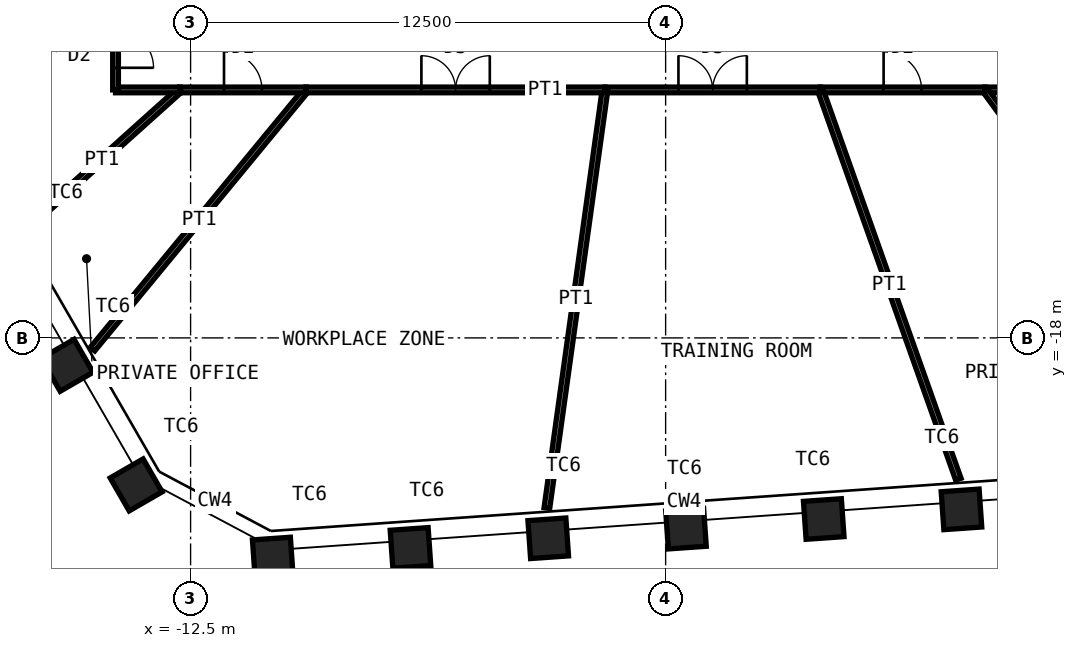
"""IFC4 building model, lengths in metres.
Left out: names, types, materials, properties, quantities, classifications, styles, units other than length and angle.
Written with IfcOpenShell. Run it as: python <this file> out.ifc"""

import sys

from ifc_helpers import new_model, si_unit, direction, frame, frame_2d, origin, origin_2d, place, context, subcontext, project, spatial, rectangle, hollow_rectangle, extrude, element, fill, save


model = new_model("IFC4")
c1 = context("Model", 3, precision=1e-05, world=origin(), true_north=direction((0.0, 1.0)))
c2 = subcontext(c1, "Body", "Model", "MODEL_VIEW")
j1 = project(units=[si_unit("LENGTHUNIT", "METRE"), si_unit("PLANEANGLEUNIT", "RADIAN")], contexts=[c1])
p1 = place(None, origin())
s1 = spatial("IfcSite", under=j1, at=p1, CompositionType="ELEMENT")
p2 = place(p1, origin())
s2 = spatial("IfcBuilding", under=s1, at=p2, CompositionType="ELEMENT")
p3 = place(p2, frame((0.0, 0.0, 243.4)))
s3 = spatial("IfcBuildingStorey", under=s2, at=p3, CompositionType="ELEMENT", Elevation=243.4)
for number, where, z_axis, x_axis in (
    (1, (7.785, -22.512, 0.0), (0.0, 0.0, 1.0), (0.998, 0.07, 0.0)),
    (2, (4.16, -22.765, 0.0), (0.0, 0.0, 1.0), (0.998, 0.07, 0.0)),
    (3, (0.536, -23.019, 0.0), (0.0, 0.0, 1.0), (0.998, 0.07, 0.0)),
    (4, (-3.089, -23.272, 0.0), (0.0, 0.0, 1.0), (0.998, 0.07, 0.0)),
    (5, (-6.714, -23.526, 0.0), (0.0, 0.0, 1.0), (0.998, 0.07, 0.0)),
    (6, (-10.338, -23.779, 0.0), (0.0, 0.0, 1.0), (0.998, 0.07, 0.0)),
    (7, (-13.933, -21.868, 0.0), (0.0, 0.0, 1.0), (0.5, -0.866, 0.0)),
    (8, (-15.749, -18.721, 0.0), (0.0, 0.0, 1.0), (0.5, -0.866, 0.0)),
):
    element("IfcColumn", number, at=place(p3, frame(where, z_axis=z_axis, x_axis=x_axis)), inside=s3, PredefinedType="COLUMN", context=c2, shape_type="SweptSolid", body=[
        extrude(hollow_rectangle(XDim=1.0, YDim=1.0, WallThickness=0.06, at=origin_2d()), origin(), (0.0, 0.0, 1.0), 4.2),
    ])
p4 = place(p3, frame((-15.08, -18.294, 0.0), z_axis=(0.0, 0.0, 1.0), x_axis=(0.636052894953, 0.771645459277, 0.0)))
e9 = element("IfcWall", 9, at=p4, inside=s3, PredefinedType="PARTITIONING", context=c2, shape_type="SweptSolid", body=[
    extrude(rectangle(XDim=8.837, YDim=0.15, at=frame_2d((4.418, 0.0))), origin(), (0.0, 0.0, 1.0), 3.43),
])
p5 = place(p3, frame((-9.459, -11.475, 0.0), z_axis=(0.0, 0.0, 1.0), x_axis=(-1.0, 0.0, 0.0)))
e10 = element("IfcWall", 10, at=p5, inside=s3, PredefinedType="PARTITIONING", context=c2, shape_type="SweptSolid", body=[
    extrude(rectangle(XDim=3.324, YDim=0.15, at=frame_2d((1.662, 0.0))), origin(), (0.0, 0.0, 1.0), 4.03),
])
p6 = place(p5, frame((1.162, 0.0, 0.0)))
e11 = element("IfcOpeningElement", 11, at=p6, cuts=e10, PredefinedType="OPENING", context=c2, shape_type="SweptSolid", body=[
    extrude(rectangle(XDim=1.0, YDim=2.4, at=frame_2d((0.5, 1.2))), frame((0.0, 0.085, 0.0), z_axis=(0.0, -1.0, 0.0), x_axis=(1.0, 0.0, 0.0)), (0.0, 0.0, 1.0), 0.17),
])
p7 = place(p3, frame((-16.885, -15.158, 0.0), z_axis=(0.0, 0.0, 1.0), x_axis=(0.744165513773, 0.667995275515, 0.0)))
e12 = element("IfcWall", 12, at=p7, inside=s3, PredefinedType="PARTITIONING", context=c2, shape_type="SweptSolid", body=[
    extrude(rectangle(XDim=5.513, YDim=0.15, at=frame_2d((2.756, 0.0))), origin(), (0.0, 0.0, 1.0), 3.43),
])
p8 = place(p3, frame((-12.783, -11.475, 0.0), z_axis=(0.0, 0.0, 1.0), x_axis=(-1.0, 0.0, 0.0)))
e13 = element("IfcWall", 13, at=p8, inside=s3, PredefinedType="PARTITIONING", context=c2, shape_type="SweptSolid", body=[
    extrude(rectangle(XDim=1.692, YDim=0.15, at=frame_2d((0.846, 0.0))), origin(), (0.0, 0.0, 1.0), 4.03),
])
p9 = place(p3, frame((-14.475, -11.475, 0.0), z_axis=(0.0, 0.0, 1.0), x_axis=(0.0, 1.0, 0.0)))
e14 = element("IfcWall", 14, at=p9, inside=s3, PredefinedType="PARTITIONING", context=c2, shape_type="SweptSolid", body=[
    extrude(rectangle(XDim=2.164, YDim=0.15, at=frame_2d((1.082, 0.0))), origin(), (0.0, 0.0, 1.0), 4.03),
])
p10 = place(p9, frame((0.582, 0.0, 0.0)))
e15 = element("IfcOpeningElement", 15, at=p10, cuts=e14, PredefinedType="OPENING", context=c2, shape_type="SweptSolid", body=[
    extrude(rectangle(XDim=1.0, YDim=2.4, at=frame_2d((0.5, 1.2))), frame((0.0, 0.085, 0.0), z_axis=(0.0, -1.0, 0.0), x_axis=(1.0, 0.0, 0.0)), (0.0, 0.0, 1.0), 0.17),
])
p11 = place(p3, frame((-18.693, -12.024, 0.0), z_axis=(0.0, 0.0, 1.0), x_axis=(0.841031335058, 0.540986407824, 0.0)))
e16 = element("IfcWall", 16, at=p11, inside=s3, PredefinedType="PARTITIONING", context=c2, shape_type="SweptSolid", body=[
    extrude(rectangle(XDim=5.015, YDim=0.15, at=frame_2d((2.507, 0.0))), origin(), (0.0, 0.0, 1.0), 3.43),
])
p12 = place(p3, frame((11.266, -11.475, 0.0), z_axis=(0.0, 0.0, 1.0), x_axis=(-1.0, 0.0, 0.0)))
e17 = element("IfcWall", 17, at=p12, inside=s3, PredefinedType="PARTITIONING", context=c2, shape_type="SweptSolid", body=[
    extrude(rectangle(XDim=2.863, YDim=0.15, at=frame_2d((1.432, 0.0))), origin(), (0.0, 0.0, 1.0), 4.03),
])
p13 = place(p12, frame((0.932, 0.0, 0.0)))
e18 = element("IfcOpeningElement", 18, at=p13, cuts=e17, PredefinedType="OPENING", context=c2, shape_type="SweptSolid", body=[
    extrude(rectangle(XDim=1.0, YDim=2.4, at=frame_2d((0.5, 1.2))), frame((0.0, 0.085, 0.0), z_axis=(0.0, -1.0, 0.0), x_axis=(1.0, 0.0, 0.0)), (0.0, 0.0, 1.0), 0.17),
])
p14 = place(p3, frame((14.339, -19.582, 0.0), z_axis=(0.0, 0.0, 1.0), x_axis=(-0.590789413226, 0.806825798559, 0.0)))
e19 = element("IfcWall", 19, at=p14, inside=s3, PredefinedType="PARTITIONING", context=c2, shape_type="SweptSolid", body=[
    extrude(rectangle(XDim=10.048, YDim=0.15, at=frame_2d((5.024, 0.0))), origin(), (0.0, 0.0, 1.0), 2.93),
])
p15 = place(p3, frame((8.403, -11.475, 0.0), z_axis=(0.0, 0.0, 1.0), x_axis=(-1.0, 0.0, 0.0)))
e20 = element("IfcWall", 20, at=p15, inside=s3, PredefinedType="PARTITIONING", context=c2, shape_type="SweptSolid", body=[
    extrude(rectangle(XDim=4.333, YDim=0.15, at=frame_2d((2.167, 0.0))), origin(), (0.0, 0.0, 1.0), 4.03),
])
p16 = place(p15, frame((1.667, 0.0, 0.0)))
e21 = element("IfcOpeningElement", 21, at=p16, cuts=e20, PredefinedType="OPENING", context=c2, shape_type="SweptSolid", body=[
    extrude(rectangle(XDim=1.0, YDim=2.4, at=frame_2d((0.5, 1.2))), frame((0.0, 0.085, 0.0), z_axis=(0.0, -1.0, 0.0), x_axis=(1.0, 0.0, 0.0)), (0.0, 0.0, 1.0), 0.17),
])
p17 = place(p3, frame((7.703, -21.719, 0.0), z_axis=(0.0, 0.0, 1.0), x_axis=(-0.334269551553, 0.942477515331, 0.0)))
e22 = element("IfcWall", 22, at=p17, inside=s3, PredefinedType="PARTITIONING", context=c2, shape_type="SweptSolid", body=[
    extrude(rectangle(XDim=10.869, YDim=0.15, at=frame_2d((5.435, 0.0))), origin(), (0.0, 0.0, 1.0), 3.43),
])
p18 = place(p3, frame((4.07, -11.475, 0.0), z_axis=(0.0, 0.0, 1.0), x_axis=(-1.0, 0.0, 0.0)))
e23 = element("IfcWall", 23, at=p18, inside=s3, PredefinedType="PARTITIONING", context=c2, shape_type="SweptSolid", body=[
    extrude(rectangle(XDim=5.665, YDim=0.15, at=frame_2d((2.832, 0.0))), origin(), (0.0, 0.0, 1.0), 4.03),
])
p19 = place(p18, frame((1.932, 0.0, 0.0)))
e24 = element("IfcOpeningElement", 24, at=p19, cuts=e23, PredefinedType="OPENING", context=c2, shape_type="SweptSolid", body=[
    extrude(rectangle(XDim=1.8, YDim=2.4, at=frame_2d((0.9, 1.2))), frame((0.0, 0.085, 0.0), z_axis=(0.0, -1.0, 0.0), x_axis=(1.0, 0.0, 0.0)), (0.0, 0.0, 1.0), 0.17),
])
p20 = place(p3, frame((-3.124, -22.475, 0.0), z_axis=(0.0, 0.0, 1.0), x_axis=(0.137683997015, 0.990476207168, 0.0)))
e25 = element("IfcWall", 25, at=p20, inside=s3, PredefinedType="PARTITIONING", context=c2, shape_type="SweptSolid", body=[
    extrude(rectangle(XDim=11.105, YDim=0.15, at=frame_2d((5.553, 0.0))), origin(), (0.0, 0.0, 1.0), 3.43),
])
p21 = place(p3, frame((-1.595, -11.475, 0.0), z_axis=(0.0, 0.0, 1.0), x_axis=(-1.0, 0.0, 0.0)))
e26 = element("IfcWall", 26, at=p21, inside=s3, PredefinedType="PARTITIONING", context=c2, shape_type="SweptSolid", body=[
    extrude(rectangle(XDim=7.864, YDim=0.15, at=frame_2d((3.932, 0.0))), origin(), (0.0, 0.0, 1.0), 4.03),
])
p22 = place(p21, frame((3.032, 0.0, 0.0)))
e27 = element("IfcOpeningElement", 27, at=p22, cuts=e26, PredefinedType="OPENING", context=c2, shape_type="SweptSolid", body=[
    extrude(rectangle(XDim=1.8, YDim=2.4, at=frame_2d((0.9, 1.2))), frame((0.0, 0.085, 0.0), z_axis=(0.0, -1.0, 0.0), x_axis=(1.0, 0.0, 0.0)), (0.0, 0.0, 1.0), 0.17),
])
p23 = place(p6, origin())
e28 = element("IfcDoor", 28, at=p23, inside=s3, OperationType="SINGLE_SWING_RIGHT", PredefinedType="DOOR", context=c2, shape_type="SweptSolid", body=[
    extrude(rectangle(XDim=1.0, YDim=2.4, at=frame_2d((0.5, 1.2))), frame((0.0, 0.025, 0.0), z_axis=(0.0, -1.0, 0.0), x_axis=(1.0, 0.0, 0.0)), (0.0, 0.0, 1.0), 0.05),
])
fill(e11, e28)
p24 = place(p10, origin())
e29 = element("IfcDoor", 29, at=p24, inside=s3, OperationType="SINGLE_SWING_LEFT", PredefinedType="DOOR", context=c2, shape_type="SweptSolid", body=[
    extrude(rectangle(XDim=1.0, YDim=2.4, at=frame_2d((0.5, 1.2))), frame((0.0, 0.025, 0.0), z_axis=(0.0, -1.0, 0.0), x_axis=(1.0, 0.0, 0.0)), (0.0, 0.0, 1.0), 0.05),
])
fill(e15, e29)
p25 = place(p16, origin())
e30 = element("IfcDoor", 30, at=p25, inside=s3, OperationType="SINGLE_SWING_RIGHT", PredefinedType="DOOR", context=c2, shape_type="SweptSolid", body=[
    extrude(rectangle(XDim=1.0, YDim=2.4, at=frame_2d((0.5, 1.2))), frame((0.0, 0.025, 0.0), z_axis=(0.0, -1.0, 0.0), x_axis=(1.0, 0.0, 0.0)), (0.0, 0.0, 1.0), 0.05),
])
fill(e21, e30)
p26 = place(p19, origin())
e31 = element("IfcDoor", 31, at=p26, inside=s3, OperationType="DOUBLE_DOOR_DOUBLE_SWING", PredefinedType="DOOR", context=c2, shape_type="SweptSolid", body=[
    extrude(rectangle(XDim=1.8, YDim=2.4, at=frame_2d((0.9, 1.2))), frame((0.0, 0.025, 0.0), z_axis=(0.0, -1.0, 0.0), x_axis=(1.0, 0.0, 0.0)), (0.0, 0.0, 1.0), 0.05),
])
fill(e24, e31)
p27 = place(p22, origin())
e32 = element("IfcDoor", 32, at=p27, inside=s3, OperationType="DOUBLE_DOOR_DOUBLE_SWING", PredefinedType="DOOR", context=c2, shape_type="SweptSolid", body=[
    extrude(rectangle(XDim=1.8, YDim=2.4, at=frame_2d((0.9, 1.2))), frame((0.0, 0.025, 0.0), z_axis=(0.0, -1.0, 0.0), x_axis=(1.0, 0.0, 0.0)), (0.0, 0.0, 1.0), 0.05),
])
fill(e27, e32)
save(model, sys.argv[1])
